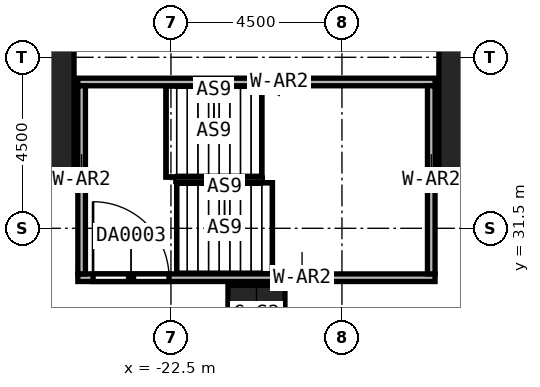
"""IFC4 building model, lengths in metres.
Left out: names, types, materials, properties, quantities, classifications, styles, units other than length and angle.
Written with IfcOpenShell. Run it as: python <this file> out.ifc"""

import sys

from ifc_helpers import new_model, si_unit, direction, frame, frame_2d, origin, origin_2d, place, context, subcontext, project, spatial, rectangle, extrude, element, fill, save


model = new_model("IFC4")
c1 = context("Model", 3, precision=1e-05, world=origin(), true_north=direction((0.0, 1.0)))
c2 = subcontext(c1, "Body", "Model", "MODEL_VIEW")
j1 = project(units=[si_unit("LENGTHUNIT", "METRE"), si_unit("PLANEANGLEUNIT", "RADIAN")], contexts=[c1])
p1 = place(None, origin())
s1 = spatial("IfcSite", under=j1, at=p1, CompositionType="ELEMENT")
p2 = place(p1, origin())
s2 = spatial("IfcBuilding", under=s1, at=p2, CompositionType="ELEMENT")
p3 = place(p2, frame((0.0, 0.0, 19.0)))
s3 = spatial("IfcBuildingStorey", under=s2, at=p3, CompositionType="ELEMENT", Elevation=19.0)
for number, where, z_axis, x_axis in (
    (1, (-27.0, 35.85, 0.0), (0.0, 0.0, 1.0), (1.0, 0.0, 0.0)),
    (2, (-13.5, 35.85, 0.0), (0.0, 0.0, 1.0), (1.0, 0.0, 0.0)),
):
    element("IfcColumn", number, at=place(p3, frame(where, z_axis=z_axis, x_axis=x_axis)), inside=s3, PredefinedType="COLUMN", context=c2, shape_type="SweptSolid", body=[
        extrude(rectangle(XDim=3.9, YDim=6.3, at=origin_2d()), origin(), (0.0, 0.0, 1.0), 6.0),
    ])
p4 = place(p3, frame((-20.25, 29.25, 0.0), z_axis=(0.0, 0.0, 1.0), x_axis=(1.0, 0.0, 0.0)))
e3 = element("IfcColumn", 3, at=p4, inside=s3, PredefinedType="COLUMN", context=c2, shape_type="SweptSolid", body=[
    extrude(rectangle(XDim=1.5, YDim=1.5, at=origin_2d()), origin(), (0.0, 0.0, 1.0), 6.0),
])
p5 = place(p3, frame((-24.95, 30.2, 0.0), z_axis=(0.0, 0.0, 1.0), x_axis=(1.0, 0.0, 0.0)))
e4 = element("IfcWall", 4, at=p5, inside=s3, PredefinedType="SOLIDWALL", context=c2, shape_type="SweptSolid", body=[
    extrude(rectangle(XDim=9.4, YDim=0.2, at=frame_2d((4.7, 0.0))), origin(), (0.0, 0.0, 1.0), 6.0),
])
p6 = place(p5, frame((0.4, 0.0, 0.0)))
e5 = element("IfcOpeningElement", 5, at=p6, cuts=e4, PredefinedType="OPENING", context=c2, shape_type="SweptSolid", body=[
    extrude(rectangle(XDim=2.0, YDim=2.4, at=frame_2d((1.0, 1.2))), frame((0.0, 0.1, 0.0), z_axis=(0.0, -1.0, 0.0), x_axis=(1.0, 0.0, 0.0)), (0.0, 0.0, 1.0), 0.2),
])
p7 = place(p3, frame((-24.95, 35.35, 0.0), z_axis=(0.0, 0.0, 1.0), x_axis=(1.0, 0.0, 0.0)))
e6 = element("IfcWall", 6, at=p7, inside=s3, PredefinedType="SOLIDWALL", context=c2, shape_type="SweptSolid", body=[
    extrude(rectangle(XDim=9.4, YDim=0.2, at=frame_2d((4.7, 0.0))), origin(), (0.0, 0.0, 1.0), 6.0),
])
for number, where, z_axis, x_axis in (
    (7, (-24.85, 30.3, 0.0), (0.0, 0.0, 1.0), (0.0, 1.0, 0.0)),
    (8, (-15.65, 30.3, 0.0), (0.0, 0.0, 1.0), (0.0, 1.0, 0.0)),
):
    element("IfcWall", number, at=place(p3, frame(where, z_axis=z_axis, x_axis=x_axis)), inside=s3, PredefinedType="SOLIDWALL", context=c2, shape_type="SweptSolid", body=[
        extrude(rectangle(XDim=4.95, YDim=0.2, at=frame_2d((2.475, 0.0))), origin(), (0.0, 0.0, 1.0), 6.0),
    ])
p8 = place(p6, origin())
e9 = element("IfcDoor", 9, at=p8, inside=s3, OperationType="DOUBLE_DOOR_SINGLE_SWING", PredefinedType="DOOR", context=c2, shape_type="SweptSolid", body=[
    extrude(rectangle(XDim=2.0, YDim=2.4, at=frame_2d((1.0, 1.2))), frame((0.0, 0.025, 0.0), z_axis=(0.0, -1.0, 0.0), x_axis=(1.0, 0.0, 0.0)), (0.0, 0.0, 1.0), 0.05),
])
fill(e5, e9)
save(model, sys.argv[1])
